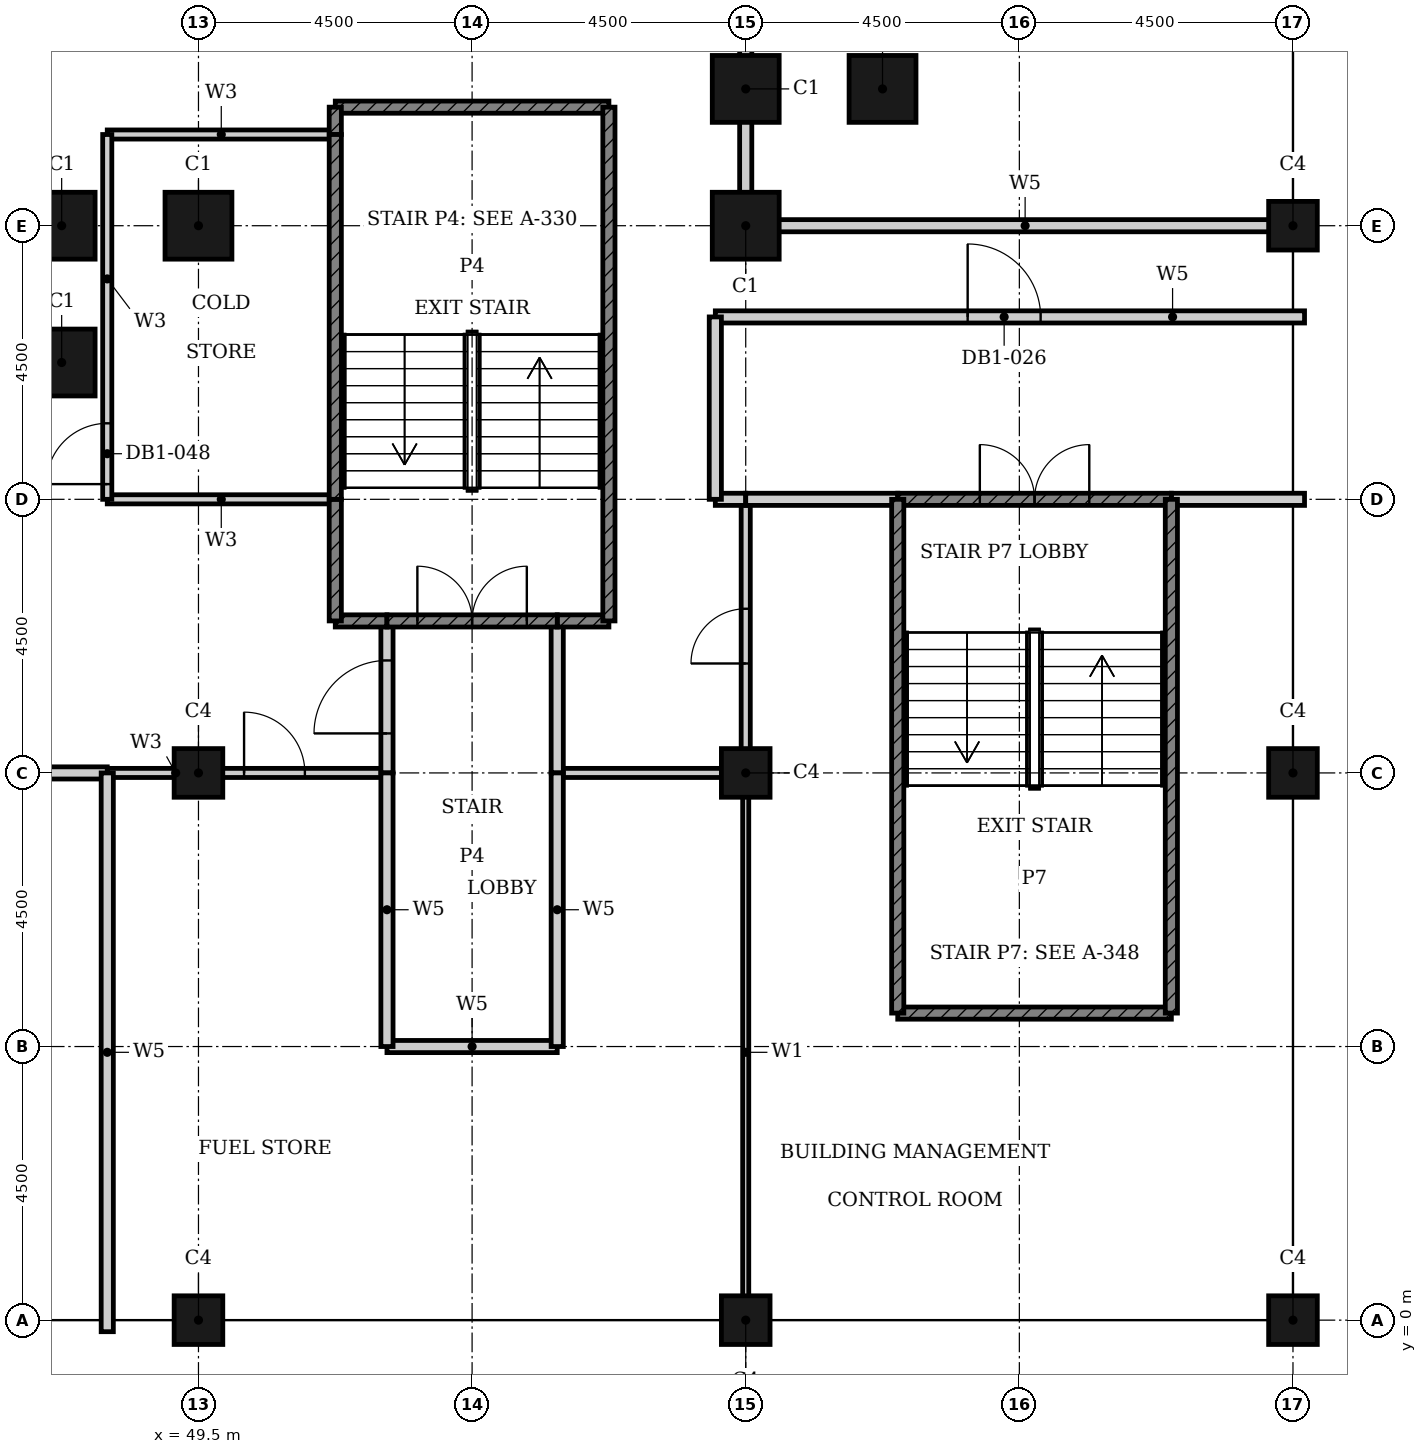
"""IFC4 building model, lengths in metres.
Left out: names, types, materials, properties, quantities, classifications, styles, units other than length and angle.
Written with IfcOpenShell. Run it as: python <this file> out.ifc"""

import sys

from ifc_helpers import new_model, si_unit, direction, frame, frame_2d, origin, origin_2d, place, context, subcontext, project, spatial, rectangle, hollow_rectangle, extrude, element, fill, save


model = new_model("IFC4")
c1 = context("Model", 3, precision=1e-05, world=origin(), true_north=direction((0.0, 1.0)))
c2 = subcontext(c1, "Body", "Model", "MODEL_VIEW")
j1 = project(units=[si_unit("LENGTHUNIT", "METRE"), si_unit("PLANEANGLEUNIT", "RADIAN")], contexts=[c1])
p1 = place(None, origin())
s1 = spatial("IfcSite", under=j1, at=p1, CompositionType="ELEMENT")
p2 = place(p1, origin())
s2 = spatial("IfcBuilding", under=s1, at=p2, CompositionType="ELEMENT")
p3 = place(p2, frame((0.0, 0.0, -6.0)))
s3 = spatial("IfcBuildingStorey", under=s2, at=p3, CompositionType="ELEMENT", Elevation=-6.0)
for number, where, z_axis, x_axis in (
    (1, (47.25, 15.75, -0.5), (0.0, 0.0, 1.0), (1.0, 0.0, 0.0)),
    (2, (47.25, 18.0, -0.5), (0.0, 0.0, 1.0), (1.0, 0.0, 0.0)),
    (3, (49.5, 18.0, -0.5), (0.0, 0.0, 1.0), (1.0, 0.0, 0.0)),
    (4, (58.5, 18.0, -0.5), (0.0, 0.0, 1.0), (1.0, 0.0, 0.0)),
    (5, (58.5, 20.25, -0.5), (0.0, 0.0, 1.0), (1.0, 0.0, 0.0)),
    (6, (60.75, 20.25, -0.5), (0.0, 0.0, 1.0), (1.0, 0.0, 0.0)),
):
    element("IfcColumn", number, at=place(p3, frame(where, z_axis=z_axis, x_axis=x_axis)), inside=s3, PredefinedType="COLUMN", context=c2, shape_type="SweptSolid", body=[
        extrude(hollow_rectangle(XDim=1.1, YDim=1.1, WallThickness=0.036, at=origin_2d()), origin(), (0.0, 0.0, 1.0), 6.5),
    ])
for number, where, z_axis, x_axis in (
    (7, (49.5, 0.0, -0.5), (0.0, 0.0, 1.0), (1.0, 0.0, 0.0)),
    (8, (58.5, 0.0, -0.5), (0.0, 0.0, 1.0), (1.0, 0.0, 0.0)),
    (9, (67.5, 0.0, -0.5), (0.0, 0.0, 1.0), (1.0, 0.0, 0.0)),
    (10, (67.5, 9.0, -0.5), (0.0, 0.0, 1.0), (1.0, 0.0, 0.0)),
    (11, (67.5, 18.0, -0.5), (0.0, 0.0, 1.0), (1.0, 0.0, 0.0)),
    (12, (49.5, 9.0, -0.5), (0.0, 0.0, 1.0), (1.0, 0.0, 0.0)),
    (13, (58.5, 9.0, -0.5), (0.0, 0.0, 1.0), (1.0, 0.0, 0.0)),
):
    element("IfcColumn", number, at=place(p3, frame(where, z_axis=z_axis, x_axis=x_axis)), inside=s3, PredefinedType="COLUMN", context=c2, shape_type="SweptSolid", body=[
        extrude(hollow_rectangle(XDim=0.8, YDim=0.8, WallThickness=0.025, at=origin_2d()), origin(), (0.0, 0.0, 1.0), 6.5),
    ])
for number, where, z_axis, x_axis in (
    (14, (48.0, 13.5, 0.0), (0.0, 0.0, 1.0), (1.0, 0.0, 0.0)),
    (15, (48.0, 19.5, 0.0), (0.0, 0.0, 1.0), (1.0, 0.0, 0.0)),
):
    element("IfcWall", number, at=place(p3, frame(where, z_axis=z_axis, x_axis=x_axis)), inside=s3, PredefinedType="PARTITIONING", context=c2, shape_type="SweptSolid", body=[
        extrude(rectangle(XDim=3.75, YDim=0.15, at=frame_2d((1.875, 0.0))), origin(), (0.0, 0.0, 1.0), 5.6),
    ])
p4 = place(p3, frame((48.0, 9.0, 0.0), z_axis=(0.0, 0.0, 1.0), x_axis=(1.0, 0.0, 0.0)))
e16 = element("IfcWall", 16, at=p4, inside=s3, PredefinedType="PARTITIONING", context=c2, shape_type="SweptSolid", body=[
    extrude(rectangle(XDim=4.6, YDim=0.15, at=frame_2d((2.3, 0.0))), origin(), (0.0, 0.0, 1.0), 5.6),
])
p5 = place(p4, frame((2.25, 0.0, 0.0)))
e17 = element("IfcOpeningElement", 17, at=p5, cuts=e16, PredefinedType="OPENING", context=c2, shape_type="SweptSolid", body=[
    extrude(rectangle(XDim=1.0, YDim=2.1, at=frame_2d((0.5, 1.05))), frame((0.0, 0.085, 0.0), z_axis=(0.0, -1.0, 0.0), x_axis=(1.0, 0.0, 0.0)), (0.0, 0.0, 1.0), 0.17),
])
p6 = place(p3, frame((55.4, 9.0, 0.0), z_axis=(0.0, 0.0, 1.0), x_axis=(1.0, 0.0, 0.0)))
e18 = element("IfcWall", 18, at=p6, inside=s3, PredefinedType="PARTITIONING", context=c2, shape_type="SweptSolid", body=[
    extrude(rectangle(XDim=3.1, YDim=0.15, at=frame_2d((1.55, 0.0))), origin(), (0.0, 0.0, 1.0), 5.6),
])
p7 = place(p3, frame((48.0, 13.5, 0.0), z_axis=(0.0, 0.0, 1.0), x_axis=(0.0, 1.0, 0.0)))
e19 = element("IfcWall", 19, at=p7, inside=s3, PredefinedType="PARTITIONING", context=c2, shape_type="SweptSolid", body=[
    extrude(rectangle(XDim=6.0, YDim=0.15, at=frame_2d((3.0, 0.0))), origin(), (0.0, 0.0, 1.0), 5.6),
])
p8 = place(p7, frame((0.25, 0.0, 0.0)))
e20 = element("IfcOpeningElement", 20, at=p8, cuts=e19, PredefinedType="OPENING", context=c2, shape_type="SweptSolid", body=[
    extrude(rectangle(XDim=1.0, YDim=2.1, at=frame_2d((0.5, 1.05))), frame((0.0, 0.085, 0.0), z_axis=(0.0, -1.0, 0.0), x_axis=(1.0, 0.0, 0.0)), (0.0, 0.0, 1.0), 0.17),
])
p9 = place(p3, frame((58.5, 9.0, 0.0), z_axis=(0.0, 0.0, 1.0), x_axis=(0.0, 1.0, 0.0)))
e21 = element("IfcWall", 21, at=p9, inside=s3, PredefinedType="PARTITIONING", context=c2, shape_type="SweptSolid", body=[
    extrude(rectangle(XDim=4.5, YDim=0.15, at=frame_2d((2.25, 0.0))), origin(), (0.0, 0.0, 1.0), 5.6),
])
p10 = place(p9, frame((1.8, 0.0, 0.0)))
e22 = element("IfcOpeningElement", 22, at=p10, cuts=e21, PredefinedType="OPENING", context=c2, shape_type="SweptSolid", body=[
    extrude(rectangle(XDim=0.9, YDim=2.1, at=frame_2d((0.45, 1.05))), frame((0.0, 0.085, 0.0), z_axis=(0.0, -1.0, 0.0), x_axis=(1.0, 0.0, 0.0)), (0.0, 0.0, 1.0), 0.17),
])
p11 = place(p3, frame((58.5, -0.19, 0.0), z_axis=(0.0, 0.0, 1.0), x_axis=(0.0, 1.0, 0.0)))
e23 = element("IfcWall", 23, at=p11, inside=s3, PredefinedType="PARTITIONING", context=c2, shape_type="SweptSolid", body=[
    extrude(rectangle(XDim=9.19, YDim=0.1, at=frame_2d((4.595, 0.0))), origin(), (0.0, 0.0, 1.0), 5.6),
])
p12 = place(p3, frame((58.0, 13.5, 0.0), z_axis=(0.0, 0.0, 1.0), x_axis=(1.0, 0.0, 0.0)))
e24 = element("IfcWall", 24, at=p12, inside=s3, PredefinedType="PARTITIONING", context=c2, shape_type="SweptSolid", body=[
    extrude(rectangle(XDim=0.5, YDim=0.2, at=frame_2d((0.25, 0.0))), origin(), (0.0, 0.0, 1.0), 5.6),
])
p13 = place(p3, frame((58.5, 13.5, 0.0), z_axis=(0.0, 0.0, 1.0), x_axis=(1.0, 0.0, 0.0)))
e25 = element("IfcWall", 25, at=p13, inside=s3, PredefinedType="PARTITIONING", context=c2, shape_type="SweptSolid", body=[
    extrude(rectangle(XDim=2.5, YDim=0.2, at=frame_2d((1.25, 0.0))), origin(), (0.0, 0.0, 1.0), 5.6),
])
p14 = place(p3, frame((65.5, 13.5, 0.0), z_axis=(0.0, 0.0, 1.0), x_axis=(1.0, 0.0, 0.0)))
e26 = element("IfcWall", 26, at=p14, inside=s3, PredefinedType="PARTITIONING", context=c2, shape_type="SweptSolid", body=[
    extrude(rectangle(XDim=2.19, YDim=0.2, at=frame_2d((1.095, 0.0))), origin(), (0.0, 0.0, 1.0), 5.6),
])
p15 = place(p3, frame((58.0, 16.5, 0.0), z_axis=(0.0, 0.0, 1.0), x_axis=(1.0, 0.0, 0.0)))
e27 = element("IfcWall", 27, at=p15, inside=s3, PredefinedType="PARTITIONING", context=c2, shape_type="SweptSolid", body=[
    extrude(rectangle(XDim=9.69, YDim=0.2, at=frame_2d((4.845, 0.0))), origin(), (0.0, 0.0, 1.0), 5.6),
])
p16 = place(p15, frame((4.15, 0.0, 0.0)))
e28 = element("IfcOpeningElement", 28, at=p16, cuts=e27, PredefinedType="OPENING", context=c2, shape_type="SweptSolid", body=[
    extrude(rectangle(XDim=1.2, YDim=2.1, at=frame_2d((0.6, 1.05))), frame((0.0, 0.11, 0.0), z_axis=(0.0, -1.0, 0.0), x_axis=(1.0, 0.0, 0.0)), (0.0, 0.0, 1.0), 0.22),
])
p17 = place(p3, frame((58.5, 18.0, 0.0), z_axis=(0.0, 0.0, 1.0), x_axis=(1.0, 0.0, 0.0)))
e29 = element("IfcWall", 29, at=p17, inside=s3, PredefinedType="PARTITIONING", context=c2, shape_type="SweptSolid", body=[
    extrude(rectangle(XDim=9.19, YDim=0.2, at=frame_2d((4.595, 0.0))), origin(), (0.0, 0.0, 1.0), 5.6),
])
p18 = place(p3, frame((52.6, 4.5, 0.0), z_axis=(0.0, 0.0, 1.0), x_axis=(1.0, 0.0, 0.0)))
e30 = element("IfcWall", 30, at=p18, inside=s3, PredefinedType="PARTITIONING", context=c2, shape_type="SweptSolid", body=[
    extrude(rectangle(XDim=2.8, YDim=0.2, at=frame_2d((1.4, 0.0))), origin(), (0.0, 0.0, 1.0), 5.6),
])
p19 = place(p3, frame((38.0, 9.0, 0.0), z_axis=(0.0, 0.0, 1.0), x_axis=(1.0, 0.0, 0.0)))
e31 = element("IfcWall", 31, at=p19, inside=s3, PredefinedType="PARTITIONING", context=c2, shape_type="SweptSolid", body=[
    extrude(rectangle(XDim=10.0, YDim=0.2, at=frame_2d((5.0, 0.0))), origin(), (0.0, 0.0, 1.0), 5.6),
])
p20 = place(p19, frame((4.4, 0.0, 0.0)))
e32 = element("IfcOpeningElement", 32, at=p20, cuts=e31, PredefinedType="OPENING", context=c2, shape_type="SweptSolid", body=[
    extrude(rectangle(XDim=1.2, YDim=2.1, at=frame_2d((0.6, 1.05))), frame((0.0, 0.11, 0.0), z_axis=(0.0, -1.0, 0.0), x_axis=(1.0, 0.0, 0.0)), (0.0, 0.0, 1.0), 0.22),
])
p21 = place(p3, frame((48.0, -0.19, 0.0), z_axis=(0.0, 0.0, 1.0), x_axis=(0.0, 1.0, 0.0)))
e33 = element("IfcWall", 33, at=p21, inside=s3, PredefinedType="PARTITIONING", context=c2, shape_type="SweptSolid", body=[
    extrude(rectangle(XDim=9.19, YDim=0.2, at=frame_2d((4.595, 0.0))), origin(), (0.0, 0.0, 1.0), 5.6),
])
p22 = place(p3, frame((52.6, 9.0, 0.0), z_axis=(0.0, 0.0, 1.0), x_axis=(0.0, 1.0, 0.0)))
e34 = element("IfcWall", 34, at=p22, inside=s3, PredefinedType="PARTITIONING", context=c2, shape_type="SweptSolid", body=[
    extrude(rectangle(XDim=2.5, YDim=0.2, at=frame_2d((1.25, 0.0))), origin(), (0.0, 0.0, 1.0), 5.6),
])
p23 = place(p22, frame((0.65, 0.0, 0.0)))
e35 = element("IfcOpeningElement", 35, at=p23, cuts=e34, PredefinedType="OPENING", context=c2, shape_type="SweptSolid", body=[
    extrude(rectangle(XDim=1.2, YDim=2.1, at=frame_2d((0.6, 1.05))), frame((0.0, 0.11, 0.0), z_axis=(0.0, -1.0, 0.0), x_axis=(1.0, 0.0, 0.0)), (0.0, 0.0, 1.0), 0.22),
])
p24 = place(p3, frame((52.6, 4.5, 0.0), z_axis=(0.0, 0.0, 1.0), x_axis=(0.0, 1.0, 0.0)))
e36 = element("IfcWall", 36, at=p24, inside=s3, PredefinedType="PARTITIONING", context=c2, shape_type="SweptSolid", body=[
    extrude(rectangle(XDim=4.5, YDim=0.2, at=frame_2d((2.25, 0.0))), origin(), (0.0, 0.0, 1.0), 5.6),
])
p25 = place(p3, frame((55.4, 9.0, 0.0), z_axis=(0.0, 0.0, 1.0), x_axis=(0.0, 1.0, 0.0)))
e37 = element("IfcWall", 37, at=p25, inside=s3, PredefinedType="PARTITIONING", context=c2, shape_type="SweptSolid", body=[
    extrude(rectangle(XDim=2.5, YDim=0.2, at=frame_2d((1.25, 0.0))), origin(), (0.0, 0.0, 1.0), 5.6),
])
p26 = place(p3, frame((55.4, 4.5, 0.0), z_axis=(0.0, 0.0, 1.0), x_axis=(0.0, 1.0, 0.0)))
e38 = element("IfcWall", 38, at=p26, inside=s3, PredefinedType="PARTITIONING", context=c2, shape_type="SweptSolid", body=[
    extrude(rectangle(XDim=4.5, YDim=0.2, at=frame_2d((2.25, 0.0))), origin(), (0.0, 0.0, 1.0), 5.6),
])
p27 = place(p3, frame((58.0, 13.5, 0.0), z_axis=(0.0, 0.0, 1.0), x_axis=(0.0, 1.0, 0.0)))
e39 = element("IfcWall", 39, at=p27, inside=s3, PredefinedType="PARTITIONING", context=c2, shape_type="SweptSolid", body=[
    extrude(rectangle(XDim=3.0, YDim=0.2, at=frame_2d((1.5, 0.0))), origin(), (0.0, 0.0, 1.0), 5.6),
])
p28 = place(p3, frame((58.5, 18.0, 0.0), z_axis=(0.0, 0.0, 1.0), x_axis=(0.0, 1.0, 0.0)))
e40 = element("IfcWall", 40, at=p28, inside=s3, PredefinedType="PARTITIONING", context=c2, shape_type="SweptSolid", body=[
    extrude(rectangle(XDim=18.0, YDim=0.2, at=frame_2d((9.0, 0.0))), origin(), (0.0, 0.0, 1.0), 5.6),
])
p29 = place(p28, frame((9.75, 0.0, 0.0)))
e41 = element("IfcOpeningElement", 41, at=p29, cuts=e40, PredefinedType="OPENING", context=c2, shape_type="SweptSolid", body=[
    extrude(rectangle(XDim=1.2, YDim=2.1, at=frame_2d((0.6, 1.05))), frame((0.0, 0.11, 0.0), z_axis=(0.0, -1.0, 0.0), x_axis=(1.0, 0.0, 0.0)), (0.0, 0.0, 1.0), 0.22),
])
for number, where, z_axis, x_axis in (
    (42, (51.75, 11.5, 0.0), (0.0, 0.0, 1.0), (1.0, 0.0, 0.0)),
    (43, (55.4, 11.5, 0.0), (0.0, 0.0, 1.0), (1.0, 0.0, 0.0)),
):
    element("IfcWall", number, at=place(p3, frame(where, z_axis=z_axis, x_axis=x_axis)), inside=s3, PredefinedType="SHEAR", context=c2, shape_type="SweptSolid", body=[
        extrude(rectangle(XDim=0.85, YDim=0.2, at=frame_2d((0.425, 0.0))), origin(), (0.0, 0.0, 1.0), 5.6),
    ])
p30 = place(p3, frame((52.6, 11.5, 0.0), z_axis=(0.0, 0.0, 1.0), x_axis=(1.0, 0.0, 0.0)))
e44 = element("IfcWall", 44, at=p30, inside=s3, PredefinedType="SHEAR", context=c2, shape_type="SweptSolid", body=[
    extrude(rectangle(XDim=2.8, YDim=0.2, at=frame_2d((1.4, 0.0))), origin(), (0.0, 0.0, 1.0), 5.6),
])
p31 = place(p30, frame((0.5, 0.0, 0.0)))
e45 = element("IfcOpeningElement", 45, at=p31, cuts=e44, PredefinedType="OPENING", context=c2, shape_type="SweptSolid", body=[
    extrude(rectangle(XDim=1.8, YDim=2.1, at=frame_2d((0.9, 1.05))), frame((0.0, 0.11, 0.0), z_axis=(0.0, -1.0, 0.0), x_axis=(1.0, 0.0, 0.0)), (0.0, 0.0, 1.0), 0.22),
])
p32 = place(p3, frame((61.0, 13.5, 0.0), z_axis=(0.0, 0.0, 1.0), x_axis=(1.0, 0.0, 0.0)))
e46 = element("IfcWall", 46, at=p32, inside=s3, PredefinedType="SHEAR", context=c2, shape_type="SweptSolid", body=[
    extrude(rectangle(XDim=4.5, YDim=0.2, at=frame_2d((2.25, 0.0))), origin(), (0.0, 0.0, 1.0), 5.6),
])
p33 = place(p32, frame((1.35, 0.0, 0.0)))
e47 = element("IfcOpeningElement", 47, at=p33, cuts=e46, PredefinedType="OPENING", context=c2, shape_type="SweptSolid", body=[
    extrude(rectangle(XDim=1.8, YDim=2.1, at=frame_2d((0.9, 1.05))), frame((0.0, 0.11, 0.0), z_axis=(0.0, -1.0, 0.0), x_axis=(1.0, 0.0, 0.0)), (0.0, 0.0, 1.0), 0.22),
])
for number, where, z_axis, x_axis in (
    (48, (51.75, 19.95, 0.0), (0.0, 0.0, 1.0), (1.0, 0.0, 0.0)),
    (49, (61.0, 5.05, 0.0), (0.0, 0.0, 1.0), (1.0, 0.0, 0.0)),
):
    element("IfcWall", number, at=place(p3, frame(where, z_axis=z_axis, x_axis=x_axis)), inside=s3, PredefinedType="SHEAR", context=c2, shape_type="SweptSolid", body=[
        extrude(rectangle(XDim=4.5, YDim=0.2, at=frame_2d((2.25, 0.0))), origin(), (0.0, 0.0, 1.0), 5.6),
    ])
p34 = place(p3, frame((51.75, 11.5, 0.0), z_axis=(0.0, 0.0, 1.0), x_axis=(0.0, 1.0, 0.0)))
e50 = element("IfcWall", 50, at=p34, inside=s3, PredefinedType="SHEAR", context=c2, shape_type="SweptSolid", body=[
    extrude(rectangle(XDim=2.0, YDim=0.2, at=frame_2d((1.0, 0.0))), origin(), (0.0, 0.0, 1.0), 5.6),
])
p35 = place(p3, frame((51.75, 19.5, 0.0), z_axis=(0.0, 0.0, 1.0), x_axis=(0.0, 1.0, 0.0)))
e51 = element("IfcWall", 51, at=p35, inside=s3, PredefinedType="SHEAR", context=c2, shape_type="SweptSolid", body=[
    extrude(rectangle(XDim=0.45, YDim=0.2, at=frame_2d((0.225, 0.0))), origin(), (0.0, 0.0, 1.0), 5.6),
])
p36 = place(p3, frame((51.75, 13.5, 0.0), z_axis=(0.0, 0.0, 1.0), x_axis=(0.0, 1.0, 0.0)))
e52 = element("IfcWall", 52, at=p36, inside=s3, PredefinedType="SHEAR", context=c2, shape_type="SweptSolid", body=[
    extrude(rectangle(XDim=6.0, YDim=0.2, at=frame_2d((3.0, 0.0))), origin(), (0.0, 0.0, 1.0), 5.6),
])
for number, where, z_axis, x_axis in (
    (53, (56.25, 11.5, 0.0), (0.0, 0.0, 1.0), (0.0, 1.0, 0.0)),
    (54, (61.0, 5.05, 0.0), (0.0, 0.0, 1.0), (0.0, 1.0, 0.0)),
    (55, (65.5, 5.05, 0.0), (0.0, 0.0, 1.0), (0.0, 1.0, 0.0)),
):
    element("IfcWall", number, at=place(p3, frame(where, z_axis=z_axis, x_axis=x_axis)), inside=s3, PredefinedType="SHEAR", context=c2, shape_type="SweptSolid", body=[
        extrude(rectangle(XDim=8.45, YDim=0.2, at=frame_2d((4.225, 0.0))), origin(), (0.0, 0.0, 1.0), 5.6),
    ])
p37 = place(p23, origin())
e56 = element("IfcDoor", 56, at=p37, inside=s3, OperationType="SINGLE_SWING_RIGHT", PredefinedType="DOOR", context=c2, shape_type="SweptSolid", body=[
    extrude(rectangle(XDim=1.2, YDim=2.1, at=frame_2d((0.6, 1.05))), frame((0.0, 0.025, 0.0), z_axis=(0.0, -1.0, 0.0), x_axis=(1.0, 0.0, 0.0)), (0.0, 0.0, 1.0), 0.05),
])
fill(e35, e56)
p38 = place(p31, origin())
e57 = element("IfcDoor", 57, at=p38, inside=s3, OperationType="DOUBLE_DOOR_SINGLE_SWING", PredefinedType="DOOR", context=c2, shape_type="SweptSolid", body=[
    extrude(rectangle(XDim=1.8, YDim=2.1, at=frame_2d((0.9, 1.05))), frame((0.0, 0.025, 0.0), z_axis=(0.0, -1.0, 0.0), x_axis=(1.0, 0.0, 0.0)), (0.0, 0.0, 1.0), 0.05),
])
fill(e45, e57)
p39 = place(p16, origin())
e58 = element("IfcDoor", 58, at=p39, inside=s3, OperationType="SINGLE_SWING_LEFT", PredefinedType="DOOR", context=c2, shape_type="SweptSolid", body=[
    extrude(rectangle(XDim=1.2, YDim=2.1, at=frame_2d((0.6, 1.05))), frame((0.0, 0.025, 0.0), z_axis=(0.0, -1.0, 0.0), x_axis=(1.0, 0.0, 0.0)), (0.0, 0.0, 1.0), 0.05),
])
fill(e28, e58)
p40 = place(p33, origin())
e59 = element("IfcDoor", 59, at=p40, inside=s3, OperationType="DOUBLE_DOOR_SINGLE_SWING", PredefinedType="DOOR", context=c2, shape_type="SweptSolid", body=[
    extrude(rectangle(XDim=1.8, YDim=2.1, at=frame_2d((0.9, 1.05))), frame((0.0, 0.025, 0.0), z_axis=(0.0, -1.0, 0.0), x_axis=(1.0, 0.0, 0.0)), (0.0, 0.0, 1.0), 0.05),
])
fill(e47, e59)
p41 = place(p10, origin())
e60 = element("IfcDoor", 60, at=p41, inside=s3, OperationType="SINGLE_SWING_LEFT", PredefinedType="DOOR", context=c2, shape_type="SweptSolid", body=[
    extrude(rectangle(XDim=0.9, YDim=2.1, at=frame_2d((0.45, 1.05))), frame((0.0, 0.025, 0.0), z_axis=(0.0, -1.0, 0.0), x_axis=(1.0, 0.0, 0.0)), (0.0, 0.0, 1.0), 0.05),
])
fill(e22, e60)
p42 = place(p5, origin())
e61 = element("IfcDoor", 61, at=p42, inside=s3, OperationType="SINGLE_SWING_RIGHT", PredefinedType="DOOR", context=c2, shape_type="SweptSolid", body=[
    extrude(rectangle(XDim=1.0, YDim=2.1, at=frame_2d((0.5, 1.05))), frame((0.0, 0.025, 0.0), z_axis=(0.0, -1.0, 0.0), x_axis=(1.0, 0.0, 0.0)), (0.0, 0.0, 1.0), 0.05),
])
fill(e17, e61)
p43 = place(p8, origin())
e62 = element("IfcDoor", 62, at=p43, inside=s3, OperationType="SINGLE_SWING_LEFT", PredefinedType="DOOR", context=c2, shape_type="SweptSolid", body=[
    extrude(rectangle(XDim=1.0, YDim=2.1, at=frame_2d((0.5, 1.05))), frame((0.0, 0.025, 0.0), z_axis=(0.0, -1.0, 0.0), x_axis=(1.0, 0.0, 0.0)), (0.0, 0.0, 1.0), 0.05),
])
fill(e20, e62)
save(model, sys.argv[1])
